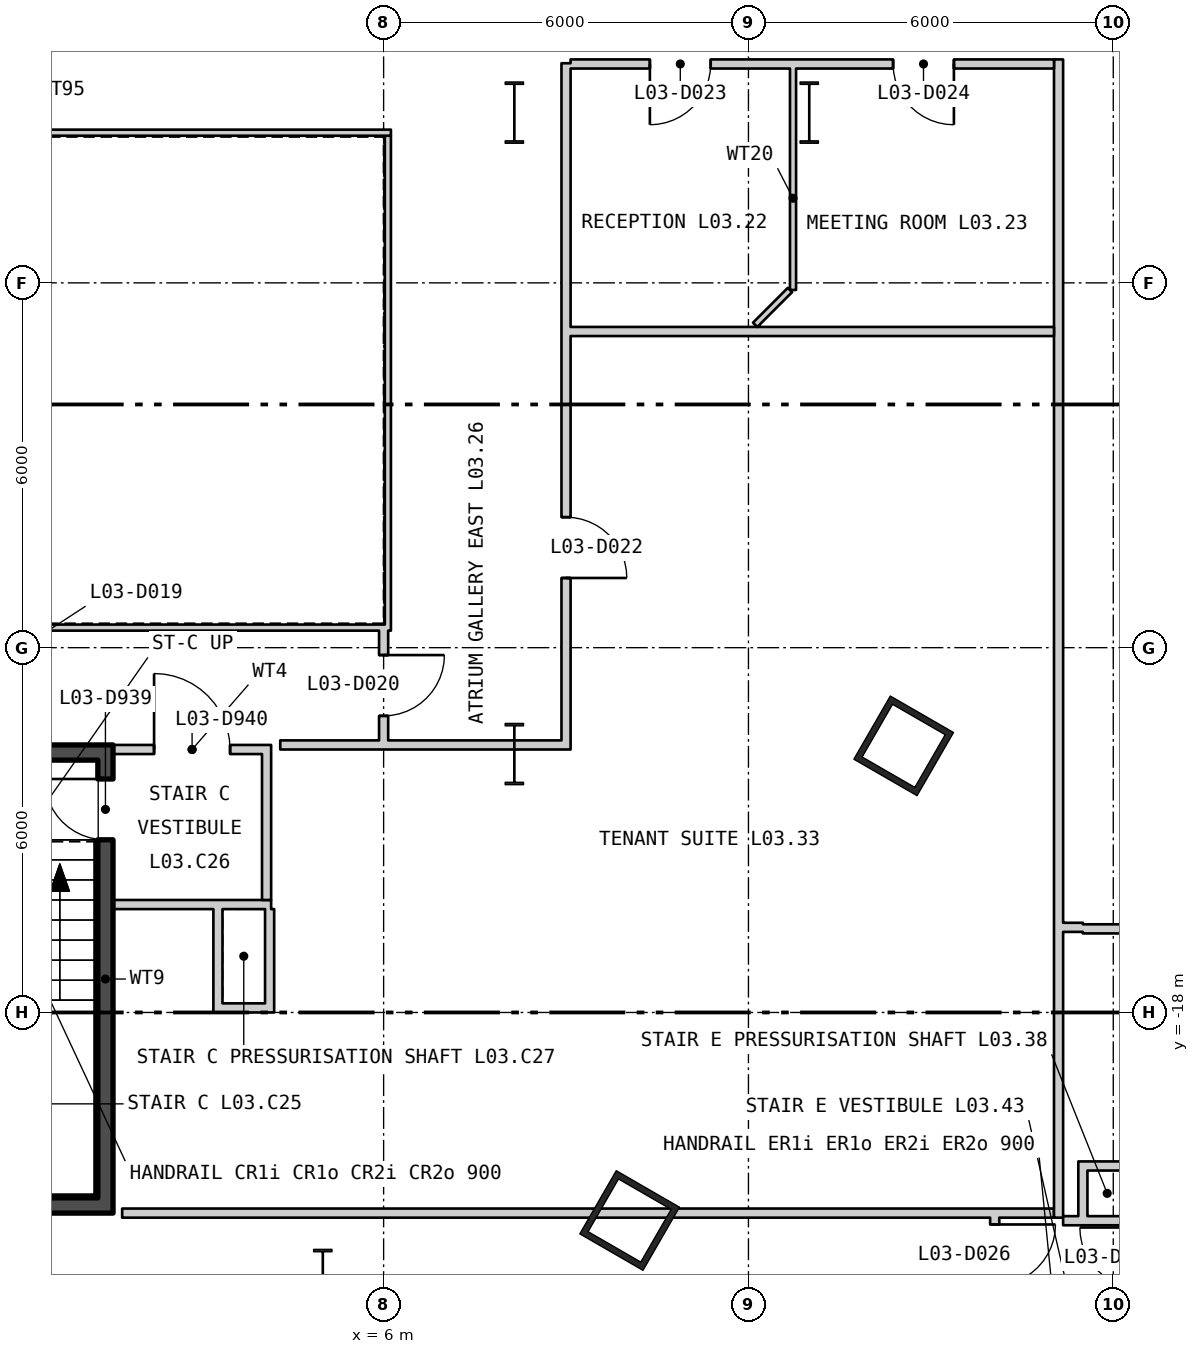
"""IFC4 building model, lengths in metres.
Left out: names, types, materials, properties, quantities, classifications, styles, units other than length and angle.
Written with IfcOpenShell. Run it as: python <this file> out.ifc"""

import sys

from ifc_helpers import new_model, si_unit, direction, frame, frame_2d, origin, origin_2d, place, context, subcontext, project, spatial, rectangle, hollow_rectangle, i_section, extrude, element, fill, save


model = new_model("IFC4")
c1 = context("Model", 3, precision=1e-05, world=origin(), true_north=direction((0.0, 1.0)))
c2 = subcontext(c1, "Body", "Model", "MODEL_VIEW")
j1 = project(units=[si_unit("LENGTHUNIT", "METRE"), si_unit("PLANEANGLEUNIT", "RADIAN")], contexts=[c1])
p1 = place(None, origin())
s1 = spatial("IfcSite", under=j1, at=p1, CompositionType="ELEMENT")
p2 = place(p1, origin())
s2 = spatial("IfcBuilding", under=s1, at=p2, CompositionType="ELEMENT")
p3 = place(p2, frame((0.0, 0.0, 18.6)))
s3 = spatial("IfcBuildingStorey", under=s2, at=p3, CompositionType="ELEMENT", Elevation=18.6)
for number, where, z_axis, x_axis in (
    (1, (10.046, -21.422, 0.0), (0.0, 0.0, 1.0), (0.5, 0.866, 0.0)),
    (2, (14.553, -13.615, 0.0), (0.0, 0.0, 1.0), (0.5, 0.866, 0.0)),
):
    element("IfcColumn", number, at=place(p3, frame(where, z_axis=z_axis, x_axis=x_axis)), inside=s3, PredefinedType="COLUMN", context=c2, shape_type="SweptSolid", body=[
        extrude(hollow_rectangle(XDim=1.2, YDim=1.2, WallThickness=0.1, at=origin_2d()), origin(), (0.0, 0.0, 1.0), 5.1),
    ])
for number, where, z_axis, x_axis in (
    (3, (8.15, -3.2, 0.0), (0.0, 0.0, 1.0), (1.0, 0.0, 0.0)),
    (4, (8.15, -13.75, 0.0), (0.0, 0.0, 1.0), (1.0, 0.0, 0.0)),
    (5, (5.0, -22.4, 0.0), (0.0, 0.0, 1.0), (1.0, 0.0, 0.0)),
    (6, (13.0, -3.2, 0.0), (0.0, 0.0, 1.0), (1.0, 0.0, 0.0)),
):
    element("IfcColumn", number, at=place(p3, frame(where, z_axis=z_axis, x_axis=x_axis)), inside=s3, PredefinedType="COLUMN", context=c2, shape_type="SweptSolid", body=[
        extrude(i_section(OverallWidth=0.302, OverallDepth=1.008, WebThickness=0.021, FlangeThickness=0.04, at=origin_2d()), origin(), (0.0, 0.0, 1.0), 5.1),
    ])
p4 = place(p3, frame((-6.12, -11.67, 0.0), z_axis=(0.0, 0.0, 1.0), x_axis=(1.0, 0.0, 0.0)))
e7 = element("IfcWall", 7, at=p4, inside=s3, PredefinedType="PARTITIONING", context=c2, shape_type="SweptSolid", body=[
    extrude(rectangle(XDim=12.24, YDim=0.1, at=frame_2d((6.12, 0.0))), origin(), (0.0, 0.0, 1.0), 4.88),
])
p5 = place(p3, frame((6.07, -11.62, 0.0), z_axis=(0.0, 0.0, 1.0), x_axis=(0.0, 1.0, 0.0)))
e8 = element("IfcWall", 8, at=p5, inside=s3, PredefinedType="PARTITIONING", context=c2, shape_type="SweptSolid", body=[
    extrude(rectangle(XDim=8.04, YDim=0.1, at=frame_2d((4.02, 0.0))), origin(), (0.0, 0.0, 1.0), 4.88),
])
p6 = place(p3, frame((6.12, -3.53, 0.0), z_axis=(0.0, 0.0, 1.0), x_axis=(-1.0, 0.0, 0.0)))
e9 = element("IfcWall", 9, at=p6, inside=s3, PredefinedType="PARTITIONING", context=c2, shape_type="SweptSolid", body=[
    extrude(rectangle(XDim=12.24, YDim=0.1, at=frame_2d((6.12, 0.0))), origin(), (0.0, 0.0, 1.0), 4.88),
])
p7 = place(p3, frame((1.425, -21.05, 0.0), z_axis=(0.0, 0.0, 1.0), x_axis=(0.0, 1.0, 0.0)))
e10 = element("IfcWall", 10, at=p7, inside=s3, PredefinedType="SHEAR", context=c2, shape_type="SweptSolid", body=[
    extrude(rectangle(XDim=7.2, YDim=0.25, at=frame_2d((3.6, 0.0))), origin(), (0.0, 0.0, 1.0), 4.88),
])
p8 = place(p7, frame((5.89, 0.0, 0.0)))
e11 = element("IfcOpeningElement", 11, at=p8, cuts=e10, PredefinedType="OPENING", context=c2, shape_type="SweptSolid", body=[
    extrude(rectangle(XDim=1.0, YDim=2.1, at=frame_2d((0.5, 1.05))), frame((0.0, 0.135, 0.0), z_axis=(0.0, -1.0, 0.0), x_axis=(1.0, 0.0, 0.0)), (0.0, 0.0, 1.0), 0.27),
])
for number, where, z_axis, x_axis in (
    (12, (-1.55, -21.175, 0.0), (0.0, 0.0, 1.0), (1.0, 0.0, 0.0)),
    (13, (-1.55, -13.725, 0.0), (0.0, 0.0, 1.0), (1.0, 0.0, 0.0)),
):
    element("IfcWall", number, at=place(p3, frame(where, z_axis=z_axis, x_axis=x_axis)), inside=s3, PredefinedType="SHEAR", context=c2, shape_type="SweptSolid", body=[
        extrude(rectangle(XDim=3.1, YDim=0.25, at=frame_2d((1.55, 0.0))), origin(), (0.0, 0.0, 1.0), 4.88),
    ])
p9 = place(p3, frame((1.55, -16.225, 0.0), z_axis=(0.0, 0.0, 1.0), x_axis=(1.0, 0.0, 0.0)))
e14 = element("IfcWall", 14, at=p9, inside=s3, PredefinedType="PARTITIONING", context=c2, shape_type="SweptSolid", body=[
    extrude(rectangle(XDim=2.6, YDim=0.15, at=frame_2d((1.3, 0.0))), origin(), (0.0, 0.0, 1.0), 4.88),
])
p10 = place(p3, frame((4.075, -16.15, 0.0), z_axis=(0.0, 0.0, 1.0), x_axis=(0.0, 1.0, 0.0)))
e15 = element("IfcWall", 15, at=p10, inside=s3, PredefinedType="PARTITIONING", context=c2, shape_type="SweptSolid", body=[
    extrude(rectangle(XDim=2.4, YDim=0.15, at=frame_2d((1.2, 0.0))), origin(), (0.0, 0.0, 1.0), 4.88),
])
p11 = place(p3, frame((1.55, -13.675, 0.0), z_axis=(0.0, 0.0, 1.0), x_axis=(1.0, 0.0, 0.0)))
e16 = element("IfcWall", 16, at=p11, inside=s3, PredefinedType="PARTITIONING", context=c2, shape_type="SweptSolid", body=[
    extrude(rectangle(XDim=2.6, YDim=0.15, at=frame_2d((1.3, 0.0))), origin(), (0.0, 0.0, 1.0), 3.97),
])
p12 = place(p11, frame((0.675, 0.0, 0.0)))
e17 = element("IfcOpeningElement", 17, at=p12, cuts=e16, PredefinedType="OPENING", context=c2, shape_type="SweptSolid", body=[
    extrude(rectangle(XDim=1.25, YDim=2.1, at=frame_2d((0.625, 1.05))), frame((0.0, 0.085, 0.0), z_axis=(0.0, -1.0, 0.0), x_axis=(1.0, 0.0, 0.0)), (0.0, 0.0, 1.0), 0.17),
])
p13 = place(p3, frame((3.275, -18.0, 0.0), z_axis=(0.0, 0.0, 1.0), x_axis=(0.0, 1.0, 0.0)))
e18 = element("IfcWall", 18, at=p13, inside=s3, PredefinedType="PARTITIONING", context=c2, shape_type="SweptSolid", body=[
    extrude(rectangle(XDim=1.7, YDim=0.15, at=frame_2d((0.85, 0.0))), origin(), (0.0, 0.0, 1.0), 4.28),
])
p14 = place(p3, frame((3.35, -17.925, 0.0), z_axis=(0.0, 0.0, 1.0), x_axis=(1.0, 0.0, 0.0)))
e19 = element("IfcWall", 19, at=p14, inside=s3, PredefinedType="PARTITIONING", context=c2, shape_type="SweptSolid", body=[
    extrude(rectangle(XDim=0.7, YDim=0.15, at=frame_2d((0.35, 0.0))), origin(), (0.0, 0.0, 1.0), 4.88),
])
p15 = place(p3, frame((4.125, -18.0, 0.0), z_axis=(0.0, 0.0, 1.0), x_axis=(0.0, 1.0, 0.0)))
e20 = element("IfcWall", 20, at=p15, inside=s3, PredefinedType="PARTITIONING", context=c2, shape_type="SweptSolid", body=[
    extrude(rectangle(XDim=1.7, YDim=0.15, at=frame_2d((0.85, 0.0))), origin(), (0.0, 0.0, 1.0), 4.88),
])
p16 = place(p3, frame((1.7, -21.3, 0.0), z_axis=(0.0, 0.0, 1.0), x_axis=(1.0, 0.0, 0.0)))
e21 = element("IfcWall", 21, at=p16, inside=s3, PredefinedType="PARTITIONING", context=c2, shape_type="SweptSolid", body=[
    extrude(rectangle(XDim=15.325, YDim=0.15, at=frame_2d((7.662, 0.0))), origin(), (0.0, 0.0, 1.0), 4.88),
])
p17 = place(p3, frame((4.3, -13.6, 0.0), z_axis=(0.0, 0.0, 1.0), x_axis=(1.0, 0.0, 0.0)))
e22 = element("IfcWall", 22, at=p17, inside=s3, PredefinedType="PARTITIONING", context=c2, shape_type="SweptSolid", body=[
    extrude(rectangle(XDim=3.85, YDim=0.15, at=frame_2d((1.925, 0.0))), origin(), (0.0, 0.0, 1.0), 3.97),
])
p18 = place(p3, frame((8.15, -13.6, 0.0), z_axis=(0.0, 0.0, 1.0), x_axis=(1.0, 0.0, 0.0)))
e23 = element("IfcWall", 23, at=p18, inside=s3, PredefinedType="PARTITIONING", context=c2, shape_type="SweptSolid", body=[
    extrude(rectangle(XDim=0.775, YDim=0.15, at=frame_2d((0.388, 0.0))), origin(), (0.0, 0.0, 1.0), 4.09),
])
p19 = place(p3, frame((6.0, -13.525, 0.0), z_axis=(0.0, 0.0, 1.0), x_axis=(0.0, 1.0, 0.0)))
e24 = element("IfcWall", 24, at=p19, inside=s3, PredefinedType="PARTITIONING", context=c2, shape_type="SweptSolid", body=[
    extrude(rectangle(XDim=1.805, YDim=0.15, at=frame_2d((0.902, 0.0))), origin(), (0.0, 0.0, 1.0), 4.88),
])
p20 = place(p19, frame((0.403, 0.0, 0.0)))
e25 = element("IfcOpeningElement", 25, at=p20, cuts=e24, PredefinedType="OPENING", context=c2, shape_type="SweptSolid", body=[
    extrude(rectangle(XDim=1.0, YDim=2.1, at=frame_2d((0.5, 1.05))), frame((0.0, 0.085, 0.0), z_axis=(0.0, -1.0, 0.0), x_axis=(1.0, 0.0, 0.0)), (0.0, 0.0, 1.0), 0.17),
])
p21 = place(p3, frame((9.0, -13.675, 0.0), z_axis=(0.0, 0.0, 1.0), x_axis=(0.0, 1.0, 0.0)))
e26 = element("IfcWall", 26, at=p21, inside=s3, PredefinedType="PARTITIONING", context=c2, shape_type="SweptSolid", body=[
    extrude(rectangle(XDim=11.287, YDim=0.15, at=frame_2d((5.644, 0.0))), origin(), (0.0, 0.0, 1.0), 4.88),
])
p22 = place(p21, frame((2.821, 0.0, 0.0)))
e27 = element("IfcOpeningElement", 27, at=p22, cuts=e26, PredefinedType="OPENING", context=c2, shape_type="SweptSolid", body=[
    extrude(rectangle(XDim=1.0, YDim=2.1, at=frame_2d((0.5, 1.05))), frame((0.0, 0.085, 0.0), z_axis=(0.0, -1.0, 0.0), x_axis=(1.0, 0.0, 0.0)), (0.0, 0.0, 1.0), 0.17),
])
p23 = place(p3, frame((9.075, -6.8, 0.0), z_axis=(0.0, 0.0, 1.0), x_axis=(1.0, 0.0, 0.0)))
e28 = element("IfcWall", 28, at=p23, inside=s3, PredefinedType="PARTITIONING", context=c2, shape_type="SweptSolid", body=[
    extrude(rectangle(XDim=7.95, YDim=0.15, at=frame_2d((3.975, 0.0))), origin(), (0.0, 0.0, 1.0), 4.88),
])
p24 = place(p3, frame((9.075, -2.4, 0.0), z_axis=(0.0, 0.0, 1.0), x_axis=(1.0, 0.0, 0.0)))
e29 = element("IfcWall", 29, at=p24, inside=s3, PredefinedType="PARTITIONING", context=c2, shape_type="SweptSolid", body=[
    extrude(rectangle(XDim=7.95, YDim=0.15, at=frame_2d((3.975, 0.0))), origin(), (0.0, 0.0, 1.0), 4.88),
])
p25 = place(p24, frame((1.304, 0.0, 0.0)))
e30 = element("IfcOpeningElement", 30, at=p25, cuts=e29, PredefinedType="OPENING", context=c2, shape_type="SweptSolid", body=[
    extrude(rectangle(XDim=1.0, YDim=2.1, at=frame_2d((0.5, 1.05))), frame((0.0, 0.085, 0.0), z_axis=(0.0, -1.0, 0.0), x_axis=(1.0, 0.0, 0.0)), (0.0, 0.0, 1.0), 0.17),
])
p26 = place(p24, frame((5.304, 0.0, 0.0)))
e31 = element("IfcOpeningElement", 31, at=p26, cuts=e29, PredefinedType="OPENING", context=c2, shape_type="SweptSolid", body=[
    extrude(rectangle(XDim=1.0, YDim=2.1, at=frame_2d((0.5, 1.05))), frame((0.0, 0.085, 0.0), z_axis=(0.0, -1.0, 0.0), x_axis=(1.0, 0.0, 0.0)), (0.0, 0.0, 1.0), 0.17),
])
p27 = place(p3, frame((12.11, -6.69, 0.0), z_axis=(0.0, 0.0, 1.0), x_axis=(0.707106781187, 0.707106781187, 0.0)))
e32 = element("IfcWall", 32, at=p27, inside=s3, PredefinedType="PARTITIONING", context=c2, shape_type="SweptSolid", body=[
    extrude(rectangle(XDim=0.81, YDim=0.1, at=frame_2d((0.405, 0.0))), origin(), (0.0, 0.0, 1.0), 4.88),
])
p28 = place(p3, frame((12.733, -6.117, 0.0), z_axis=(0.0, 0.0, 1.0), x_axis=(0.0, 1.0, 0.0)))
e33 = element("IfcWall", 33, at=p28, inside=s3, PredefinedType="PARTITIONING", context=c2, shape_type="SweptSolid", body=[
    extrude(rectangle(XDim=3.017, YDim=0.1, at=frame_2d((1.508, 0.0))), origin(), (0.0, 0.0, 1.0), 4.19),
])
p29 = place(p3, frame((12.733, -3.1, 0.0), z_axis=(0.0, 0.0, 1.0), x_axis=(0.0, 1.0, 0.0)))
e34 = element("IfcWall", 34, at=p29, inside=s3, PredefinedType="PARTITIONING", context=c2, shape_type="SweptSolid", body=[
    extrude(rectangle(XDim=0.625, YDim=0.1, at=frame_2d((0.312, 0.0))), origin(), (0.0, 0.0, 1.0), 4.28),
])
p30 = place(p3, frame((16.05, -23.55, 0.0), z_axis=(0.0, 0.0, 1.0), x_axis=(0.0, 1.0, 0.0)))
e35 = element("IfcWall", 35, at=p30, inside=s3, PredefinedType="PARTITIONING", context=c2, shape_type="SweptSolid", body=[
    extrude(rectangle(XDim=2.175, YDim=0.15, at=frame_2d((1.087, 0.0))), origin(), (0.0, 0.0, 1.0), 4.88),
])
p31 = place(p30, frame((1.063, 0.0, 0.0)))
e36 = element("IfcOpeningElement", 36, at=p31, cuts=e35, PredefinedType="OPENING", context=c2, shape_type="SweptSolid", body=[
    extrude(rectangle(XDim=1.0, YDim=2.1, at=frame_2d((0.5, 1.05))), frame((0.0, 0.085, 0.0), z_axis=(0.0, -1.0, 0.0), x_axis=(1.0, 0.0, 0.0)), (0.0, 0.0, 1.0), 0.17),
])
p32 = place(p3, frame((17.1, -21.375, 0.0), z_axis=(0.0, 0.0, 1.0), x_axis=(0.0, 1.0, 0.0)))
e37 = element("IfcWall", 37, at=p32, inside=s3, PredefinedType="PARTITIONING", context=c2, shape_type="SweptSolid", body=[
    extrude(rectangle(XDim=19.05, YDim=0.15, at=frame_2d((9.525, 0.0))), origin(), (0.0, 0.0, 1.0), 4.88),
])
p33 = place(p3, frame((17.175, -21.425, 0.0), z_axis=(0.0, 0.0, 1.0), x_axis=(1.0, 0.0, 0.0)))
e38 = element("IfcWall", 38, at=p33, inside=s3, PredefinedType="PARTITIONING", context=c2, shape_type="SweptSolid", body=[
    extrude(rectangle(XDim=0.25, YDim=0.15, at=frame_2d((0.125, 0.0))), origin(), (0.0, 0.0, 1.0), 4.88),
])
p34 = place(p3, frame((17.175, -16.6, 0.0), z_axis=(0.0, 0.0, 1.0), x_axis=(1.0, 0.0, 0.0)))
e39 = element("IfcWall", 39, at=p34, inside=s3, PredefinedType="PARTITIONING", context=c2, shape_type="SweptSolid", body=[
    extrude(rectangle(XDim=0.325, YDim=0.15, at=frame_2d((0.163, 0.0))), origin(), (0.0, 0.0, 1.0), 4.88),
])
p35 = place(p3, frame((17.5, -21.5, 0.0), z_axis=(0.0, 0.0, 1.0), x_axis=(0.0, 1.0, 0.0)))
e40 = element("IfcWall", 40, at=p35, inside=s3, PredefinedType="PARTITIONING", context=c2, shape_type="SweptSolid", body=[
    extrude(rectangle(XDim=1.05, YDim=0.15, at=frame_2d((0.525, 0.0))), origin(), (0.0, 0.0, 1.0), 4.88),
])
p36 = place(p3, frame((17.5, -16.625, 0.0), z_axis=(0.0, 0.0, 1.0), x_axis=(1.0, 0.0, 0.0)))
e41 = element("IfcWall", 41, at=p36, inside=s3, PredefinedType="PARTITIONING", context=c2, shape_type="SweptSolid", body=[
    extrude(rectangle(XDim=2.325, YDim=0.15, at=frame_2d((1.163, 0.0))), origin(), (0.0, 0.0, 1.0), 4.88),
])
p37 = place(p36, frame((0.662, 0.0, 0.0)))
e42 = element("IfcOpeningElement", 42, at=p37, cuts=e41, PredefinedType="OPENING", context=c2, shape_type="SweptSolid", body=[
    extrude(rectangle(XDim=1.0, YDim=2.1, at=frame_2d((0.5, 1.05))), frame((0.0, 0.085, 0.0), z_axis=(0.0, -1.0, 0.0), x_axis=(1.0, 0.0, 0.0)), (0.0, 0.0, 1.0), 0.17),
])
for number, where, z_axis, x_axis in (
    (43, (17.575, -21.425, 0.0), (0.0, 0.0, 1.0), (1.0, 0.0, 0.0)),
    (44, (17.575, -20.525, 0.0), (0.0, 0.0, 1.0), (1.0, 0.0, 0.0)),
):
    element("IfcWall", number, at=place(p3, frame(where, z_axis=z_axis, x_axis=x_axis)), inside=s3, PredefinedType="PARTITIONING", context=c2, shape_type="SweptSolid", body=[
        extrude(rectangle(XDim=0.65, YDim=0.15, at=frame_2d((0.325, 0.0))), origin(), (0.0, 0.0, 1.0), 4.88),
    ])
p38 = place(p8, origin())
e45 = element("IfcDoor", 45, at=p38, inside=s3, OperationType="SINGLE_SWING_LEFT", PredefinedType="DOOR", context=c2, shape_type="SweptSolid", body=[
    extrude(rectangle(XDim=1.0, YDim=2.1, at=frame_2d((0.5, 1.05))), frame((0.0, 0.025, 0.0), z_axis=(0.0, -1.0, 0.0), x_axis=(1.0, 0.0, 0.0)), (0.0, 0.0, 1.0), 0.05),
])
fill(e11, e45)
p39 = place(p12, origin())
e46 = element("IfcDoor", 46, at=p39, inside=s3, OperationType="SINGLE_SWING_RIGHT", PredefinedType="DOOR", context=c2, shape_type="SweptSolid", body=[
    extrude(rectangle(XDim=1.25, YDim=2.1, at=frame_2d((0.625, 1.05))), frame((0.0, 0.025, 0.0), z_axis=(0.0, -1.0, 0.0), x_axis=(1.0, 0.0, 0.0)), (0.0, 0.0, 1.0), 0.05),
])
fill(e17, e46)
p40 = place(p20, origin())
e47 = element("IfcDoor", 47, at=p40, inside=s3, OperationType="SINGLE_SWING_RIGHT", PredefinedType="DOOR", context=c2, shape_type="SweptSolid", body=[
    extrude(rectangle(XDim=1.0, YDim=2.1, at=frame_2d((0.5, 1.05))), frame((0.0, 0.025, 0.0), z_axis=(0.0, -1.0, 0.0), x_axis=(1.0, 0.0, 0.0)), (0.0, 0.0, 1.0), 0.05),
])
fill(e25, e47)
p41 = place(p22, origin())
e48 = element("IfcDoor", 48, at=p41, inside=s3, OperationType="SINGLE_SWING_LEFT", PredefinedType="DOOR", context=c2, shape_type="SweptSolid", body=[
    extrude(rectangle(XDim=1.0, YDim=2.1, at=frame_2d((0.5, 1.05))), frame((0.0, 0.025, 0.0), z_axis=(0.0, -1.0, 0.0), x_axis=(1.0, 0.0, 0.0)), (0.0, 0.0, 1.0), 0.05),
])
fill(e27, e48)
p42 = place(p25, origin())
e49 = element("IfcDoor", 49, at=p42, inside=s3, OperationType="SINGLE_SWING_LEFT", PredefinedType="DOOR", context=c2, shape_type="SweptSolid", body=[
    extrude(rectangle(XDim=1.0, YDim=2.1, at=frame_2d((0.5, 1.05))), frame((0.0, 0.025, 0.0), z_axis=(0.0, -1.0, 0.0), x_axis=(1.0, 0.0, 0.0)), (0.0, 0.0, 1.0), 0.05),
])
fill(e30, e49)
p43 = place(p26, origin())
e50 = element("IfcDoor", 50, at=p43, inside=s3, OperationType="SINGLE_SWING_RIGHT", PredefinedType="DOOR", context=c2, shape_type="SweptSolid", body=[
    extrude(rectangle(XDim=1.0, YDim=2.1, at=frame_2d((0.5, 1.05))), frame((0.0, 0.025, 0.0), z_axis=(0.0, -1.0, 0.0), x_axis=(1.0, 0.0, 0.0)), (0.0, 0.0, 1.0), 0.05),
])
fill(e31, e50)
p44 = place(p31, origin())
e51 = element("IfcDoor", 51, at=p44, inside=s3, OperationType="SINGLE_SWING_RIGHT", PredefinedType="DOOR", context=c2, shape_type="SweptSolid", body=[
    extrude(rectangle(XDim=1.0, YDim=2.1, at=frame_2d((0.5, 1.05))), frame((0.0, 0.025, 0.0), z_axis=(0.0, -1.0, 0.0), x_axis=(1.0, 0.0, 0.0)), (0.0, 0.0, 1.0), 0.05),
])
fill(e36, e51)
save(model, sys.argv[1])
